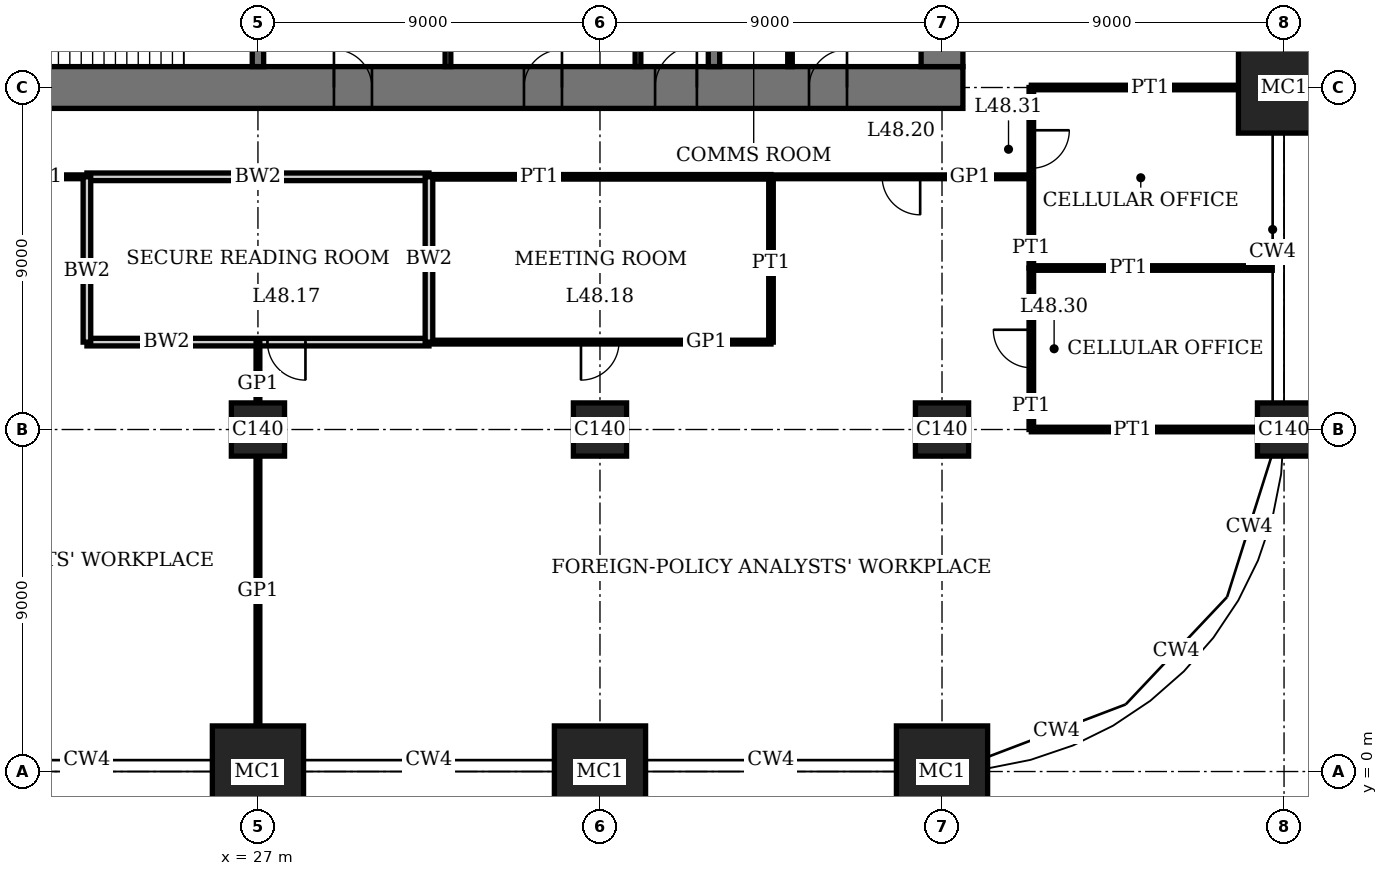
"""IFC4 building model, lengths in metres.
Left out: names, types, materials, properties, quantities, classifications, styles, units other than length and angle.
Written with IfcOpenShell. Run it as: python <this file> out.ifc"""

import sys

from ifc_helpers import new_model, si_unit, direction, frame, frame_2d, origin, origin_2d, place, context, subcontext, project, spatial, rectangle, extrude, element, fill, save


model = new_model("IFC4")
c1 = context("Model", 3, precision=1e-05, world=origin(), true_north=direction((0.0, 1.0)))
c2 = subcontext(c1, "Body", "Model", "MODEL_VIEW")
j1 = project(units=[si_unit("LENGTHUNIT", "METRE"), si_unit("PLANEANGLEUNIT", "RADIAN")], contexts=[c1])
p1 = place(None, origin())
s1 = spatial("IfcSite", under=j1, at=p1, CompositionType="ELEMENT")
p2 = place(p1, origin())
s2 = spatial("IfcBuilding", under=s1, at=p2, CompositionType="ELEMENT")
p3 = place(p2, frame((0.0, 0.0, 198.2)))
s3 = spatial("IfcBuildingStorey", under=s2, at=p3, CompositionType="ELEMENT", Elevation=198.2)
p4 = place(p3, frame((27.0, 0.0, 0.0), z_axis=(0.0, 0.0, 1.0), x_axis=(1.0, 0.0, 0.0)))
e1 = element("IfcColumn", 1, at=p4, inside=s3, PredefinedType="COLUMN", context=c2, shape_type="SweptSolid", body=[
    extrude(rectangle(XDim=2.4, YDim=2.4, at=origin_2d()), origin(), (0.0, 0.0, 1.0), 4.0),
])
p5 = place(p3, frame((27.0, 9.0, 0.0), z_axis=(0.0, 0.0, 1.0), x_axis=(1.0, 0.0, 0.0)))
e2 = element("IfcColumn", 2, at=p5, inside=s3, PredefinedType="COLUMN", context=c2, shape_type="SweptSolid", body=[
    extrude(rectangle(XDim=1.4, YDim=1.4, at=origin_2d()), origin(), (0.0, 0.0, 1.0), 4.0),
])
p6 = place(p3, frame((36.0, 0.0, 0.0), z_axis=(0.0, 0.0, 1.0), x_axis=(1.0, 0.0, 0.0)))
e3 = element("IfcColumn", 3, at=p6, inside=s3, PredefinedType="COLUMN", context=c2, shape_type="SweptSolid", body=[
    extrude(rectangle(XDim=2.4, YDim=2.4, at=origin_2d()), origin(), (0.0, 0.0, 1.0), 4.0),
])
p7 = place(p3, frame((36.0, 9.0, 0.0), z_axis=(0.0, 0.0, 1.0), x_axis=(1.0, 0.0, 0.0)))
e4 = element("IfcColumn", 4, at=p7, inside=s3, PredefinedType="COLUMN", context=c2, shape_type="SweptSolid", body=[
    extrude(rectangle(XDim=1.4, YDim=1.4, at=origin_2d()), origin(), (0.0, 0.0, 1.0), 4.0),
])
p8 = place(p3, frame((45.0, 0.0, 0.0), z_axis=(0.0, 0.0, 1.0), x_axis=(1.0, 0.0, 0.0)))
e5 = element("IfcColumn", 5, at=p8, inside=s3, PredefinedType="COLUMN", context=c2, shape_type="SweptSolid", body=[
    extrude(rectangle(XDim=2.4, YDim=2.4, at=origin_2d()), origin(), (0.0, 0.0, 1.0), 4.0),
])
for number, where, z_axis, x_axis in (
    (6, (45.0, 9.0, 0.0), (0.0, 0.0, 1.0), (1.0, 0.0, 0.0)),
    (7, (54.0, 9.0, 0.0), (0.0, 0.0, 1.0), (1.0, 0.0, 0.0)),
):
    element("IfcColumn", number, at=place(p3, frame(where, z_axis=z_axis, x_axis=x_axis)), inside=s3, PredefinedType="COLUMN", context=c2, shape_type="SweptSolid", body=[
        extrude(rectangle(XDim=1.4, YDim=1.4, at=origin_2d()), origin(), (0.0, 0.0, 1.0), 4.0),
    ])
p9 = place(p3, frame((54.0, 18.0, 0.0), z_axis=(0.0, 0.0, 1.0), x_axis=(1.0, 0.0, 0.0)))
e8 = element("IfcColumn", 8, at=p9, inside=s3, PredefinedType="COLUMN", context=c2, shape_type="SweptSolid", body=[
    extrude(rectangle(XDim=2.4, YDim=2.4, at=origin_2d()), origin(), (0.0, 0.0, 1.0), 4.0),
])
p10 = place(p3, frame((17.45, 18.0, 0.0), z_axis=(0.0, 0.0, 1.0), x_axis=(1.0, 0.0, 0.0)))
e9 = element("IfcWall", 9, at=p10, inside=s3, PredefinedType="SHEAR", context=c2, shape_type="SweptSolid", body=[
    extrude(rectangle(XDim=28.1, YDim=1.1, at=frame_2d((14.05, 0.0))), origin(), (0.0, 0.0, 1.0), 4.0),
])
p11 = place(p10, frame((11.55, 0.0, 0.0)))
e10 = element("IfcOpeningElement", 10, at=p11, cuts=e9, PredefinedType="OPENING", context=c2, shape_type="SweptSolid", body=[
    extrude(rectangle(XDim=1.0, YDim=2.4, at=frame_2d((0.5, 1.2))), frame((0.0, 0.56, 0.0), z_axis=(0.0, -1.0, 0.0), x_axis=(1.0, 0.0, 0.0)), (0.0, 0.0, 1.0), 1.12),
])
p12 = place(p10, frame((16.55, 0.0, 0.0)))
e11 = element("IfcOpeningElement", 11, at=p12, cuts=e9, PredefinedType="OPENING", context=c2, shape_type="SweptSolid", body=[
    extrude(rectangle(XDim=1.0, YDim=2.4, at=frame_2d((0.5, 1.2))), frame((0.0, 0.56, 0.0), z_axis=(0.0, -1.0, 0.0), x_axis=(1.0, 0.0, 0.0)), (0.0, 0.0, 1.0), 1.12),
])
p13 = place(p10, frame((20.0, 0.0, 0.0)))
e12 = element("IfcOpeningElement", 12, at=p13, cuts=e9, PredefinedType="OPENING", context=c2, shape_type="SweptSolid", body=[
    extrude(rectangle(XDim=1.1, YDim=2.4, at=frame_2d((0.55, 1.2))), frame((0.0, 0.56, 0.0), z_axis=(0.0, -1.0, 0.0), x_axis=(1.0, 0.0, 0.0)), (0.0, 0.0, 1.0), 1.12),
])
p14 = place(p10, frame((24.05, 0.0, 0.0)))
e13 = element("IfcOpeningElement", 13, at=p14, cuts=e9, PredefinedType="OPENING", context=c2, shape_type="SweptSolid", body=[
    extrude(rectangle(XDim=1.0, YDim=2.4, at=frame_2d((0.5, 1.2))), frame((0.0, 0.56, 0.0), z_axis=(0.0, -1.0, 0.0), x_axis=(1.0, 0.0, 0.0)), (0.0, 0.0, 1.0), 1.12),
])
p15 = place(p3, frame((45.0, 18.55, 0.0), z_axis=(0.0, 0.0, 1.0), x_axis=(0.0, 1.0, 0.0)))
e14 = element("IfcWall", 14, at=p15, inside=s3, PredefinedType="SHEAR", context=c2, shape_type="SweptSolid", body=[
    extrude(rectangle(XDim=16.9, YDim=1.1, at=frame_2d((8.45, 0.0))), origin(), (0.0, 0.0, 1.0), 4.0),
])
p16 = place(p15, frame((8.45, 0.0, 0.0)))
e15 = element("IfcOpeningElement", 15, at=p16, cuts=e14, PredefinedType="OPENING", context=c2, shape_type="SweptSolid", body=[
    extrude(rectangle(XDim=1.8, YDim=2.4, at=frame_2d((0.9, 1.2))), frame((0.0, 0.56, 0.0), z_axis=(0.0, -1.0, 0.0), x_axis=(1.0, 0.0, 0.0)), (0.0, 0.0, 1.0), 1.12),
])
p17 = place(p3, frame((27.0, 18.55, 0.0), z_axis=(0.0, 0.0, 1.0), x_axis=(0.0, 1.0, 0.0)))
e16 = element("IfcWall", 16, at=p17, inside=s3, PredefinedType="SHEAR", context=c2, shape_type="SweptSolid", body=[
    extrude(rectangle(XDim=3.05, YDim=0.3, at=frame_2d((1.525, 0.0))), origin(), (0.0, 0.0, 1.0), 4.0),
])
p18 = place(p3, frame((39.0, 18.55, 0.0), z_axis=(0.0, 0.0, 1.0), x_axis=(0.0, 1.0, 0.0)))
e17 = element("IfcWall", 17, at=p18, inside=s3, PredefinedType="SHEAR", context=c2, shape_type="SweptSolid", body=[
    extrude(rectangle(XDim=5.9, YDim=0.3, at=frame_2d((2.95, 0.0))), origin(), (0.0, 0.0, 1.0), 4.0),
])
p19 = place(p3, frame((47.35, 9.0, 0.0), z_axis=(0.0, 0.0, 1.0), x_axis=(1.0, 0.0, 0.0)))
e18 = element("IfcWall", 18, at=p19, inside=s3, PredefinedType="PARTITIONING", context=c2, shape_type="SweptSolid", body=[
    extrude(rectangle(XDim=5.95, YDim=0.12, at=frame_2d((2.975, 0.0))), origin(), (0.0, 0.0, 1.0), 3.05),
])
p20 = place(p3, frame((22.5, 11.3, 0.0), z_axis=(0.0, 0.0, 1.0), x_axis=(1.0, 0.0, 0.0)))
e19 = element("IfcWall", 19, at=p20, inside=s3, PredefinedType="SOLIDWALL", context=c2, shape_type="SweptSolid", body=[
    extrude(rectangle(XDim=9.0, YDim=0.2, at=frame_2d((4.5, 0.0))), origin(), (0.0, 0.0, 1.0), 3.75),
])
p21 = place(p20, frame((4.75, 0.0, 0.0)))
e20 = element("IfcOpeningElement", 20, at=p21, cuts=e19, PredefinedType="OPENING", context=c2, shape_type="SweptSolid", body=[
    extrude(rectangle(XDim=1.0, YDim=2.4, at=frame_2d((0.5, 1.2))), frame((0.0, 0.11, 0.0), z_axis=(0.0, -1.0, 0.0), x_axis=(1.0, 0.0, 0.0)), (0.0, 0.0, 1.0), 0.22),
])
p22 = place(p3, frame((31.5, 11.3, 0.0), z_axis=(0.0, 0.0, 1.0), x_axis=(1.0, 0.0, 0.0)))
e21 = element("IfcWall", 21, at=p22, inside=s3, PredefinedType="PARTITIONING", context=c2, shape_type="SweptSolid", body=[
    extrude(rectangle(XDim=9.0, YDim=0.1, at=frame_2d((4.5, 0.0))), origin(), (0.0, 0.0, 1.0), 3.75),
])
p23 = place(p22, frame((4.0, 0.0, 0.0)))
e22 = element("IfcOpeningElement", 22, at=p23, cuts=e21, PredefinedType="OPENING", context=c2, shape_type="SweptSolid", body=[
    extrude(rectangle(XDim=1.0, YDim=2.4, at=frame_2d((0.5, 1.2))), frame((0.0, 0.06, 0.0), z_axis=(0.0, -1.0, 0.0), x_axis=(1.0, 0.0, 0.0)), (0.0, 0.0, 1.0), 0.12),
])
p24 = place(p3, frame((47.35, 13.25, 0.0), z_axis=(0.0, 0.0, 1.0), x_axis=(1.0, 0.0, 0.0)))
e23 = element("IfcWall", 23, at=p24, inside=s3, PredefinedType="PARTITIONING", context=c2, shape_type="SweptSolid", body=[
    extrude(rectangle(XDim=6.34, YDim=0.12, at=frame_2d((3.17, 0.0))), origin(), (0.0, 0.0, 1.0), 3.1),
])
p25 = place(p3, frame((22.5, 15.65, 0.0), z_axis=(0.0, 0.0, 1.0), x_axis=(1.0, 0.0, 0.0)))
e24 = element("IfcWall", 24, at=p25, inside=s3, PredefinedType="SOLIDWALL", context=c2, shape_type="SweptSolid", body=[
    extrude(rectangle(XDim=9.0, YDim=0.2, at=frame_2d((4.5, 0.0))), origin(), (0.0, 0.0, 1.0), 3.75),
])
p26 = place(p3, frame((31.5, 15.65, 0.0), z_axis=(0.0, 0.0, 1.0), x_axis=(1.0, 0.0, 0.0)))
e25 = element("IfcWall", 25, at=p26, inside=s3, PredefinedType="PARTITIONING", context=c2, shape_type="SweptSolid", body=[
    extrude(rectangle(XDim=9.0, YDim=0.12, at=frame_2d((4.5, 0.0))), origin(), (0.0, 0.0, 1.0), 3.75),
])
p27 = place(p3, frame((15.65, 15.65, 0.0), z_axis=(0.0, 0.0, 1.0), x_axis=(1.0, 0.0, 0.0)))
e26 = element("IfcWall", 26, at=p27, inside=s3, PredefinedType="PARTITIONING", context=c2, shape_type="SweptSolid", body=[
    extrude(rectangle(XDim=6.85, YDim=0.1, at=frame_2d((3.425, 0.0))), origin(), (0.0, 0.0, 1.0), 3.75),
])
p28 = place(p27, frame((2.925, 0.0, 0.0)))
e27 = element("IfcOpeningElement", 27, at=p28, cuts=e26, PredefinedType="OPENING", context=c2, shape_type="SweptSolid", body=[
    extrude(rectangle(XDim=1.0, YDim=2.4, at=frame_2d((0.5, 1.2))), frame((0.0, 0.06, 0.0), z_axis=(0.0, -1.0, 0.0), x_axis=(1.0, 0.0, 0.0)), (0.0, 0.0, 1.0), 0.12),
])
p29 = place(p3, frame((40.5, 15.65, 0.0), z_axis=(0.0, 0.0, 1.0), x_axis=(1.0, 0.0, 0.0)))
e28 = element("IfcWall", 28, at=p29, inside=s3, PredefinedType="PARTITIONING", context=c2, shape_type="SweptSolid", body=[
    extrude(rectangle(XDim=6.85, YDim=0.1, at=frame_2d((3.425, 0.0))), origin(), (0.0, 0.0, 1.0), 3.75),
])
p30 = place(p29, frame((2.925, 0.0, 0.0)))
e29 = element("IfcOpeningElement", 29, at=p30, cuts=e28, PredefinedType="OPENING", context=c2, shape_type="SweptSolid", body=[
    extrude(rectangle(XDim=1.0, YDim=2.4, at=frame_2d((0.5, 1.2))), frame((0.0, 0.06, 0.0), z_axis=(0.0, -1.0, 0.0), x_axis=(1.0, 0.0, 0.0)), (0.0, 0.0, 1.0), 0.12),
])
p31 = place(p3, frame((47.35, 18.0, 0.0), z_axis=(0.0, 0.0, 1.0), x_axis=(1.0, 0.0, 0.0)))
e30 = element("IfcWall", 30, at=p31, inside=s3, PredefinedType="PARTITIONING", context=c2, shape_type="SweptSolid", body=[
    extrude(rectangle(XDim=5.45, YDim=0.12, at=frame_2d((2.725, 0.0))), origin(), (0.0, 0.0, 1.0), 3.05),
])
p32 = place(p3, frame((22.5, 11.3, 0.0), z_axis=(0.0, 0.0, 1.0), x_axis=(0.0, 1.0, 0.0)))
e31 = element("IfcWall", 31, at=p32, inside=s3, PredefinedType="SOLIDWALL", context=c2, shape_type="SweptSolid", body=[
    extrude(rectangle(XDim=4.35, YDim=0.2, at=frame_2d((2.175, 0.0))), origin(), (0.0, 0.0, 1.0), 3.75),
])
p33 = place(p3, frame((27.0, 1.2, 0.0), z_axis=(0.0, 0.0, 1.0), x_axis=(0.0, 1.0, 0.0)))
e32 = element("IfcWall", 32, at=p33, inside=s3, PredefinedType="PARTITIONING", context=c2, shape_type="SweptSolid", body=[
    extrude(rectangle(XDim=7.1, YDim=0.1, at=frame_2d((3.55, 0.0))), origin(), (0.0, 0.0, 1.0), 3.05),
])
p34 = place(p3, frame((27.0, 9.7, 0.0), z_axis=(0.0, 0.0, 1.0), x_axis=(0.0, 1.0, 0.0)))
e33 = element("IfcWall", 33, at=p34, inside=s3, PredefinedType="PARTITIONING", context=c2, shape_type="SweptSolid", body=[
    extrude(rectangle(XDim=1.61, YDim=0.1, at=frame_2d((0.805, 0.0))), origin(), (0.0, 0.0, 1.0), 3.05),
])
p35 = place(p3, frame((31.5, 11.3, 0.0), z_axis=(0.0, 0.0, 1.0), x_axis=(0.0, 1.0, 0.0)))
e34 = element("IfcWall", 34, at=p35, inside=s3, PredefinedType="SOLIDWALL", context=c2, shape_type="SweptSolid", body=[
    extrude(rectangle(XDim=4.35, YDim=0.2, at=frame_2d((2.175, 0.0))), origin(), (0.0, 0.0, 1.0), 3.75),
])
p36 = place(p3, frame((40.5, 11.3, 0.0), z_axis=(0.0, 0.0, 1.0), x_axis=(0.0, 1.0, 0.0)))
e35 = element("IfcWall", 35, at=p36, inside=s3, PredefinedType="PARTITIONING", context=c2, shape_type="SweptSolid", body=[
    extrude(rectangle(XDim=4.35, YDim=0.12, at=frame_2d((2.175, 0.0))), origin(), (0.0, 0.0, 1.0), 3.75),
])
p37 = place(p3, frame((47.35, 9.0, 0.0), z_axis=(0.0, 0.0, 1.0), x_axis=(0.0, 1.0, 0.0)))
e36 = element("IfcWall", 36, at=p37, inside=s3, PredefinedType="PARTITIONING", context=c2, shape_type="SweptSolid", body=[
    extrude(rectangle(XDim=4.25, YDim=0.12, at=frame_2d((2.125, 0.0))), origin(), (0.0, 0.0, 1.0), 3.75),
])
p38 = place(p37, frame((1.625, 0.0, 0.0)))
e37 = element("IfcOpeningElement", 37, at=p38, cuts=e36, PredefinedType="OPENING", context=c2, shape_type="SweptSolid", body=[
    extrude(rectangle(XDim=1.0, YDim=2.4, at=frame_2d((0.5, 1.2))), frame((0.0, 0.07, 0.0), z_axis=(0.0, -1.0, 0.0), x_axis=(1.0, 0.0, 0.0)), (0.0, 0.0, 1.0), 0.14),
])
p39 = place(p3, frame((47.35, 13.25, 0.0), z_axis=(0.0, 0.0, 1.0), x_axis=(0.0, 1.0, 0.0)))
e38 = element("IfcWall", 38, at=p39, inside=s3, PredefinedType="PARTITIONING", context=c2, shape_type="SweptSolid", body=[
    extrude(rectangle(XDim=4.75, YDim=0.12, at=frame_2d((2.375, 0.0))), origin(), (0.0, 0.0, 1.0), 3.75),
])
p40 = place(p39, frame((2.625, 0.0, 0.0)))
e39 = element("IfcOpeningElement", 39, at=p40, cuts=e38, PredefinedType="OPENING", context=c2, shape_type="SweptSolid", body=[
    extrude(rectangle(XDim=1.0, YDim=2.4, at=frame_2d((0.5, 1.2))), frame((0.0, 0.07, 0.0), z_axis=(0.0, -1.0, 0.0), x_axis=(1.0, 0.0, 0.0)), (0.0, 0.0, 1.0), 0.14),
])
for number, where, z_axis, x_axis in (
    (40, (32.0, 18.55, 0.0), (0.0, 0.0, 1.0), (0.0, 1.0, 0.0)),
    (41, (37.0, 18.55, 0.0), (0.0, 0.0, 1.0), (0.0, 1.0, 0.0)),
):
    element("IfcWall", number, at=place(p3, frame(where, z_axis=z_axis, x_axis=x_axis)), inside=s3, PredefinedType="PARTITIONING", context=c2, shape_type="SweptSolid", body=[
        extrude(rectangle(XDim=2.9, YDim=0.15, at=frame_2d((1.45, 0.0))), origin(), (0.0, 0.0, 1.0), 3.75),
    ])
p41 = place(p3, frame((41.0, 18.55, 0.0), z_axis=(0.0, 0.0, 1.0), x_axis=(0.0, 1.0, 0.0)))
e42 = element("IfcWall", 42, at=p41, inside=s3, PredefinedType="PARTITIONING", context=c2, shape_type="SweptSolid", body=[
    extrude(rectangle(XDim=2.9, YDim=0.12, at=frame_2d((1.45, 0.0))), origin(), (0.0, 0.0, 1.0), 3.75),
])
p42 = place(p41, frame((0.95, 0.0, 0.0)))
e43 = element("IfcOpeningElement", 43, at=p42, cuts=e42, PredefinedType="OPENING", context=c2, shape_type="SweptSolid", body=[
    extrude(rectangle(XDim=1.0, YDim=2.4, at=frame_2d((0.5, 1.2))), frame((0.0, 0.07, 0.0), z_axis=(0.0, -1.0, 0.0), x_axis=(1.0, 0.0, 0.0)), (0.0, 0.0, 1.0), 0.14),
])
p43 = place(p11, origin())
e44 = element("IfcDoor", 44, at=p43, inside=s3, OperationType="SINGLE_SWING_RIGHT", PredefinedType="DOOR", context=c2, shape_type="SweptSolid", body=[
    extrude(rectangle(XDim=1.0, YDim=2.4, at=frame_2d((0.5, 1.2))), frame((0.0, 0.025, 0.0), z_axis=(0.0, -1.0, 0.0), x_axis=(1.0, 0.0, 0.0)), (0.0, 0.0, 1.0), 0.05),
    extrude(rectangle(XDim=0.04, YDim=2.4, at=frame_2d((0.02, 1.2))), frame((0.0, 0.4, 0.0), z_axis=(0.0, -1.0, 0.0), x_axis=(1.0, 0.0, 0.0)), (0.0, 0.0, 1.0), 0.8),
    extrude(rectangle(XDim=0.04, YDim=2.4, at=frame_2d((0.98, 1.2))), frame((0.0, 0.4, 0.0), z_axis=(0.0, -1.0, 0.0), x_axis=(1.0, 0.0, 0.0)), (0.0, 0.0, 1.0), 0.8),
    extrude(rectangle(XDim=1.0, YDim=0.04, at=frame_2d((0.5, 2.38))), frame((0.0, 0.4, 0.0), z_axis=(0.0, -1.0, 0.0), x_axis=(1.0, 0.0, 0.0)), (0.0, 0.0, 1.0), 0.8),
])
fill(e10, e44)
p44 = place(p12, origin())
e45 = element("IfcDoor", 45, at=p44, inside=s3, OperationType="SINGLE_SWING_LEFT", PredefinedType="DOOR", context=c2, shape_type="SweptSolid", body=[
    extrude(rectangle(XDim=1.0, YDim=2.4, at=frame_2d((0.5, 1.2))), frame((0.0, 0.025, 0.0), z_axis=(0.0, -1.0, 0.0), x_axis=(1.0, 0.0, 0.0)), (0.0, 0.0, 1.0), 0.05),
    extrude(rectangle(XDim=0.04, YDim=2.4, at=frame_2d((0.02, 1.2))), frame((0.0, 0.4, 0.0), z_axis=(0.0, -1.0, 0.0), x_axis=(1.0, 0.0, 0.0)), (0.0, 0.0, 1.0), 0.8),
    extrude(rectangle(XDim=0.04, YDim=2.4, at=frame_2d((0.98, 1.2))), frame((0.0, 0.4, 0.0), z_axis=(0.0, -1.0, 0.0), x_axis=(1.0, 0.0, 0.0)), (0.0, 0.0, 1.0), 0.8),
    extrude(rectangle(XDim=1.0, YDim=0.04, at=frame_2d((0.5, 2.38))), frame((0.0, 0.4, 0.0), z_axis=(0.0, -1.0, 0.0), x_axis=(1.0, 0.0, 0.0)), (0.0, 0.0, 1.0), 0.8),
])
fill(e11, e45)
p45 = place(p13, origin())
e46 = element("IfcDoor", 46, at=p45, inside=s3, OperationType="SINGLE_SWING_LEFT", PredefinedType="DOOR", context=c2, shape_type="SweptSolid", body=[
    extrude(rectangle(XDim=1.1, YDim=2.4, at=frame_2d((0.55, 1.2))), frame((0.0, 0.025, 0.0), z_axis=(0.0, -1.0, 0.0), x_axis=(1.0, 0.0, 0.0)), (0.0, 0.0, 1.0), 0.05),
    extrude(rectangle(XDim=0.04, YDim=2.4, at=frame_2d((0.02, 1.2))), frame((0.0, 0.44, 0.0), z_axis=(0.0, -1.0, 0.0), x_axis=(1.0, 0.0, 0.0)), (0.0, 0.0, 1.0), 0.88),
    extrude(rectangle(XDim=0.04, YDim=2.4, at=frame_2d((1.08, 1.2))), frame((0.0, 0.44, 0.0), z_axis=(0.0, -1.0, 0.0), x_axis=(1.0, 0.0, 0.0)), (0.0, 0.0, 1.0), 0.88),
    extrude(rectangle(XDim=1.1, YDim=0.04, at=frame_2d((0.55, 2.38))), frame((0.0, 0.44, 0.0), z_axis=(0.0, -1.0, 0.0), x_axis=(1.0, 0.0, 0.0)), (0.0, 0.0, 1.0), 0.88),
])
fill(e12, e46)
p46 = place(p14, origin())
e47 = element("IfcDoor", 47, at=p46, inside=s3, OperationType="SINGLE_SWING_LEFT", PredefinedType="DOOR", context=c2, shape_type="SweptSolid", body=[
    extrude(rectangle(XDim=1.0, YDim=2.4, at=frame_2d((0.5, 1.2))), frame((0.0, 0.025, 0.0), z_axis=(0.0, -1.0, 0.0), x_axis=(1.0, 0.0, 0.0)), (0.0, 0.0, 1.0), 0.05),
    extrude(rectangle(XDim=0.04, YDim=2.4, at=frame_2d((0.02, 1.2))), frame((0.0, 0.4, 0.0), z_axis=(0.0, -1.0, 0.0), x_axis=(1.0, 0.0, 0.0)), (0.0, 0.0, 1.0), 0.8),
    extrude(rectangle(XDim=0.04, YDim=2.4, at=frame_2d((0.98, 1.2))), frame((0.0, 0.4, 0.0), z_axis=(0.0, -1.0, 0.0), x_axis=(1.0, 0.0, 0.0)), (0.0, 0.0, 1.0), 0.8),
    extrude(rectangle(XDim=1.0, YDim=0.04, at=frame_2d((0.5, 2.38))), frame((0.0, 0.4, 0.0), z_axis=(0.0, -1.0, 0.0), x_axis=(1.0, 0.0, 0.0)), (0.0, 0.0, 1.0), 0.8),
])
fill(e13, e47)
p47 = place(p21, origin())
e48 = element("IfcDoor", 48, at=p47, inside=s3, OperationType="SINGLE_SWING_RIGHT", PredefinedType="DOOR", context=c2, shape_type="SweptSolid", body=[
    extrude(rectangle(XDim=1.0, YDim=2.4, at=frame_2d((0.5, 1.2))), frame((0.0, 0.035, 0.0), z_axis=(0.0, -1.0, 0.0), x_axis=(1.0, 0.0, 0.0)), (0.0, 0.0, 1.0), 0.07),
])
fill(e20, e48)
p48 = place(p23, origin())
e49 = element("IfcDoor", 49, at=p48, inside=s3, OperationType="SINGLE_SWING_LEFT", PredefinedType="DOOR", context=c2, shape_type="SweptSolid", body=[
    extrude(rectangle(XDim=1.0, YDim=2.4, at=frame_2d((0.5, 1.2))), frame((0.0, 0.02, 0.0), z_axis=(0.0, -1.0, 0.0), x_axis=(1.0, 0.0, 0.0)), (0.0, 0.0, 1.0), 0.04),
])
fill(e22, e49)
p49 = place(p30, origin())
e50 = element("IfcDoor", 50, at=p49, inside=s3, OperationType="SINGLE_SWING_RIGHT", PredefinedType="DOOR", context=c2, shape_type="SweptSolid", body=[
    extrude(rectangle(XDim=1.0, YDim=2.4, at=frame_2d((0.5, 1.2))), frame((0.0, 0.02, 0.0), z_axis=(0.0, -1.0, 0.0), x_axis=(1.0, 0.0, 0.0)), (0.0, 0.0, 1.0), 0.04),
])
fill(e29, e50)
p50 = place(p38, origin())
e51 = element("IfcDoor", 51, at=p50, inside=s3, OperationType="SINGLE_SWING_LEFT", PredefinedType="DOOR", context=c2, shape_type="SweptSolid", body=[
    extrude(rectangle(XDim=1.0, YDim=2.4, at=frame_2d((0.5, 1.2))), frame((0.0, 0.025, 0.0), z_axis=(0.0, -1.0, 0.0), x_axis=(1.0, 0.0, 0.0)), (0.0, 0.0, 1.0), 0.05),
])
fill(e37, e51)
p51 = place(p40, origin())
e52 = element("IfcDoor", 52, at=p51, inside=s3, OperationType="SINGLE_SWING_RIGHT", PredefinedType="DOOR", context=c2, shape_type="SweptSolid", body=[
    extrude(rectangle(XDim=1.0, YDim=2.4, at=frame_2d((0.5, 1.2))), frame((0.0, 0.025, 0.0), z_axis=(0.0, -1.0, 0.0), x_axis=(1.0, 0.0, 0.0)), (0.0, 0.0, 1.0), 0.05),
])
fill(e39, e52)
save(model, sys.argv[1])
